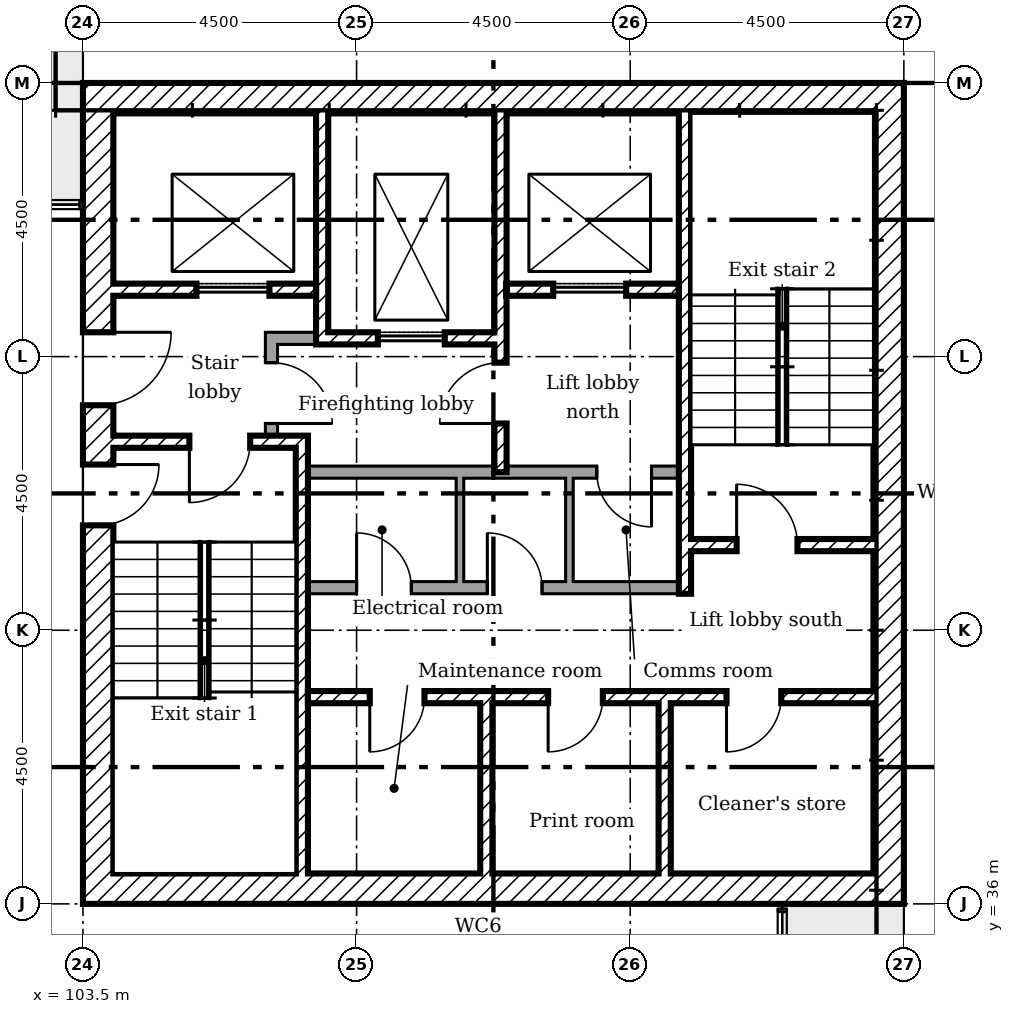
"""IFC4 building model, lengths in metres.
Left out: names, types, materials, properties, quantities, classifications, styles, units other than length and angle.
Written with IfcOpenShell. Run it as: python <this file> out.ifc"""

import sys

from ifc_helpers import new_model, si_unit, direction, frame, frame_2d, origin, place, context, subcontext, project, spatial, rectangle, extrude, element, fill, save


model = new_model("IFC4")
c1 = context("Model", 3, precision=1e-05, world=origin(), true_north=direction((0.0, 1.0)))
c2 = subcontext(c1, "Body", "Model", "MODEL_VIEW")
j1 = project(units=[si_unit("LENGTHUNIT", "METRE"), si_unit("PLANEANGLEUNIT", "RADIAN")], contexts=[c1])
p1 = place(None, origin())
s1 = spatial("IfcSite", under=j1, at=p1, CompositionType="ELEMENT")
p2 = place(p1, origin())
s2 = spatial("IfcBuilding", under=s1, at=p2, CompositionType="ELEMENT")
p3 = place(p2, frame((0.0, 0.0, 195.6)))
s3 = spatial("IfcBuildingStorey", under=s2, at=p3, CompositionType="ELEMENT", Elevation=195.6)
p4 = place(p3, frame((116.75, 36.0, 0.0), z_axis=(0.0, 0.0, 1.0), x_axis=(0.0, 1.0, 0.0)))
e1 = element("IfcWall", 1, at=p4, inside=s3, PredefinedType="SHEAR", context=c2, shape_type="SweptSolid", body=[
    extrude(rectangle(XDim=13.5, YDim=0.5, at=frame_2d((6.75, 0.0))), origin(), (0.0, 0.0, 1.0), 3.35),
])
for number, where in (
    (2, (103.5, 49.25, 0.0)),
    (3, (103.5, 36.25, 0.0)),
):
    element("IfcWall", number, at=place(p3, frame(where)), inside=s3, PredefinedType="SHEAR", context=c2, shape_type="SweptSolid", body=[
        extrude(rectangle(XDim=13.0, YDim=0.5, at=frame_2d((6.5, 0.0))), origin(), (0.0, 0.0, 1.0), 3.35),
    ])
p5 = place(p3, frame((103.75, 36.5, 0.0), z_axis=(0.0, 0.0, 1.0), x_axis=(0.0, 1.0, 0.0)))
e4 = element("IfcWall", 4, at=p5, inside=s3, PredefinedType="SHEAR", context=c2, shape_type="SweptSolid", body=[
    extrude(rectangle(XDim=12.5, YDim=0.5, at=frame_2d((6.25, 0.0))), origin(), (0.0, 0.0, 1.0), 3.35),
])
p6 = place(p5, frame((7.7, 0.0, 0.0)))
e5 = element("IfcOpeningElement", 5, at=p6, cuts=e4, PredefinedType="OPENING", context=c2, shape_type="SweptSolid", body=[
    extrude(rectangle(XDim=1.2, YDim=2.1, at=frame_2d((0.6, 1.05))), frame((0.0, 0.26, 0.0), z_axis=(0.0, -1.0, 0.0), x_axis=(1.0, 0.0, 0.0)), (0.0, 0.0, 1.0), 0.52),
])
p7 = place(p5, frame((5.725, 0.0, 0.0)))
e6 = element("IfcOpeningElement", 6, at=p7, cuts=e4, PredefinedType="OPENING", context=c2, shape_type="SweptSolid", body=[
    extrude(rectangle(XDim=1.0, YDim=2.1, at=frame_2d((0.5, 1.05))), frame((0.0, 0.26, 0.0), z_axis=(0.0, -1.0, 0.0), x_axis=(1.0, 0.0, 0.0)), (0.0, 0.0, 1.0), 0.52),
])
p8 = place(p3, frame((107.433, 49.0, 0.0), z_axis=(0.0, 0.0, 1.0), x_axis=(0.0, -1.0, 0.0)))
e7 = element("IfcWall", 7, at=p8, inside=s3, PredefinedType="SHEAR", context=c2, shape_type="SweptSolid", body=[
    extrude(rectangle(XDim=3.8, YDim=0.2, at=frame_2d((1.9, 0.0))), origin(), (0.0, 0.0, 1.0), 3.35),
])
p9 = place(p3, frame((110.367, 49.0, 0.0), z_axis=(0.0, 0.0, 1.0), x_axis=(0.0, -1.0, 0.0)))
e8 = element("IfcWall", 8, at=p9, inside=s3, PredefinedType="SHEAR", context=c2, shape_type="SweptSolid", body=[
    extrude(rectangle(XDim=5.9, YDim=0.2, at=frame_2d((2.95, 0.0))), origin(), (0.0, 0.0, 1.0), 3.35),
])
p10 = place(p9, frame((4.1, 0.0, 0.0)))
e9 = element("IfcOpeningElement", 9, at=p10, cuts=e8, PredefinedType="OPENING", context=c2, shape_type="SweptSolid", body=[
    extrude(rectangle(XDim=1.0, YDim=2.1, at=frame_2d((0.5, 1.05))), frame((0.0, 0.11, 0.0), z_axis=(0.0, -1.0, 0.0), x_axis=(1.0, 0.0, 0.0)), (0.0, 0.0, 1.0), 0.22),
])
for number, where, z_axis, x_axis in (
    (10, (110.133, 36.5, 0.0), (0.0, 0.0, 1.0), (0.0, 1.0, 0.0)),
    (11, (113.067, 36.5, 0.0), (0.0, 0.0, 1.0), (0.0, 1.0, 0.0)),
):
    element("IfcWall", number, at=place(p3, frame(where, z_axis=z_axis, x_axis=x_axis)), inside=s3, PredefinedType="SHEAR", context=c2, shape_type="SweptSolid", body=[
        extrude(rectangle(XDim=2.8, YDim=0.2, at=frame_2d((1.4, 0.0))), origin(), (0.0, 0.0, 1.0), 3.35),
    ])
p11 = place(p3, frame((106.5, 45.3, 0.0)))
e12 = element("IfcWall", 12, at=p11, inside=s3, PredefinedType="PARTITIONING", context=c2, shape_type="SweptSolid", body=[
    extrude(rectangle(XDim=0.833, YDim=0.2, at=frame_2d((0.417, 0.0))), origin(), (0.0, 0.0, 1.0), 3.35),
])
p12 = place(p3, frame((106.6, 43.7, 0.0), z_axis=(0.0, 0.0, 1.0), x_axis=(0.0, 1.0, 0.0)))
e13 = element("IfcWall", 13, at=p12, inside=s3, PredefinedType="PARTITIONING", context=c2, shape_type="SweptSolid", body=[
    extrude(rectangle(XDim=1.5, YDim=0.2, at=frame_2d((0.75, 0.0))), origin(), (0.0, 0.0, 1.0), 3.35),
])
p13 = place(p12, frame((0.2, 0.0, 0.0)))
e14 = element("IfcOpeningElement", 14, at=p13, cuts=e13, PredefinedType="OPENING", context=c2, shape_type="SweptSolid", body=[
    extrude(rectangle(XDim=1.0, YDim=2.1, at=frame_2d((0.5, 1.05))), frame((0.0, 0.11, 0.0), z_axis=(0.0, -1.0, 0.0), x_axis=(1.0, 0.0, 0.0)), (0.0, 0.0, 1.0), 0.22),
])
p14 = place(p3, frame((104.0, 46.1, 0.0)))
e15 = element("IfcWall", 15, at=p14, inside=s3, PredefinedType="SHEAR", context=c2, shape_type="SweptSolid", body=[
    extrude(rectangle(XDim=3.333, YDim=0.2, at=frame_2d((1.667, 0.0))), origin(), (0.0, 0.0, 1.0), 3.35),
])
p15 = place(p14, frame((1.367, 0.0, 0.0)))
e16 = element("IfcOpeningElement", 16, at=p15, cuts=e15, PredefinedType="OPENING", context=c2, shape_type="SweptSolid", body=[
    extrude(rectangle(XDim=1.2, YDim=2.1, at=frame_2d((0.6, 1.05))), frame((0.0, 0.11, 0.0), z_axis=(0.0, -1.0, 0.0), x_axis=(1.0, 0.0, 0.0)), (0.0, 0.0, 1.0), 0.22),
])
p16 = place(p3, frame((110.467, 46.1, 0.0)))
e17 = element("IfcWall", 17, at=p16, inside=s3, PredefinedType="SHEAR", context=c2, shape_type="SweptSolid", body=[
    extrude(rectangle(XDim=2.833, YDim=0.2, at=frame_2d((1.417, 0.0))), origin(), (0.0, 0.0, 1.0), 3.35),
])
p17 = place(p16, frame((0.767, 0.0, 0.0)))
e18 = element("IfcOpeningElement", 18, at=p17, cuts=e17, PredefinedType="OPENING", context=c2, shape_type="SweptSolid", body=[
    extrude(rectangle(XDim=1.2, YDim=2.1, at=frame_2d((0.6, 1.05))), frame((0.0, 0.11, 0.0), z_axis=(0.0, -1.0, 0.0), x_axis=(1.0, 0.0, 0.0)), (0.0, 0.0, 1.0), 0.22),
])
p18 = place(p3, frame((107.533, 45.3, 0.0)))
e19 = element("IfcWall", 19, at=p18, inside=s3, PredefinedType="SHEAR", context=c2, shape_type="SweptSolid", body=[
    extrude(rectangle(XDim=2.733, YDim=0.2, at=frame_2d((1.367, 0.0))), origin(), (0.0, 0.0, 1.0), 3.35),
])
p19 = place(p18, frame((0.817, 0.0, 0.0)))
e20 = element("IfcOpeningElement", 20, at=p19, cuts=e19, PredefinedType="OPENING", context=c2, shape_type="SweptSolid", body=[
    extrude(rectangle(XDim=1.1, YDim=2.1, at=frame_2d((0.55, 1.05))), frame((0.0, 0.11, 0.0), z_axis=(0.0, -1.0, 0.0), x_axis=(1.0, 0.0, 0.0)), (0.0, 0.0, 1.0), 0.22),
])
p20 = place(p3, frame((107.2, 39.4, 0.0)))
e21 = element("IfcWall", 21, at=p20, inside=s3, PredefinedType="SHEAR", context=c2, shape_type="SweptSolid", body=[
    extrude(rectangle(XDim=9.3, YDim=0.2, at=frame_2d((4.65, 0.0))), origin(), (0.0, 0.0, 1.0), 3.35),
])
p21 = place(p20, frame((1.017, 0.0, 0.0)))
e22 = element("IfcOpeningElement", 22, at=p21, cuts=e21, PredefinedType="OPENING", context=c2, shape_type="SweptSolid", body=[
    extrude(rectangle(XDim=0.9, YDim=2.1, at=frame_2d((0.45, 1.05))), frame((0.0, 0.11, 0.0), z_axis=(0.0, -1.0, 0.0), x_axis=(1.0, 0.0, 0.0)), (0.0, 0.0, 1.0), 0.22),
])
p22 = place(p20, frame((3.95, 0.0, 0.0)))
e23 = element("IfcOpeningElement", 23, at=p22, cuts=e21, PredefinedType="OPENING", context=c2, shape_type="SweptSolid", body=[
    extrude(rectangle(XDim=0.9, YDim=2.1, at=frame_2d((0.45, 1.05))), frame((0.0, 0.11, 0.0), z_axis=(0.0, -1.0, 0.0), x_axis=(1.0, 0.0, 0.0)), (0.0, 0.0, 1.0), 0.22),
])
p23 = place(p20, frame((6.883, 0.0, 0.0)))
e24 = element("IfcOpeningElement", 24, at=p23, cuts=e21, PredefinedType="OPENING", context=c2, shape_type="SweptSolid", body=[
    extrude(rectangle(XDim=0.9, YDim=2.1, at=frame_2d((0.45, 1.05))), frame((0.0, 0.11, 0.0), z_axis=(0.0, -1.0, 0.0), x_axis=(1.0, 0.0, 0.0)), (0.0, 0.0, 1.0), 0.22),
])
p24 = place(p3, frame((107.1, 36.5, 0.0), z_axis=(0.0, 0.0, 1.0), x_axis=(0.0, 1.0, 0.0)))
e25 = element("IfcWall", 25, at=p24, inside=s3, PredefinedType="SHEAR", context=c2, shape_type="SweptSolid", body=[
    extrude(rectangle(XDim=7.2, YDim=0.2, at=frame_2d((3.6, 0.0))), origin(), (0.0, 0.0, 1.0), 3.35),
])
p25 = place(p3, frame((104.0, 43.6, 0.0)))
e26 = element("IfcWall", 26, at=p25, inside=s3, PredefinedType="SHEAR", context=c2, shape_type="SweptSolid", body=[
    extrude(rectangle(XDim=3.0, YDim=0.2, at=frame_2d((1.5, 0.0))), origin(), (0.0, 0.0, 1.0), 3.35),
])
p26 = place(p25, frame((1.25, 0.0, 0.0)))
e27 = element("IfcOpeningElement", 27, at=p26, cuts=e26, PredefinedType="OPENING", context=c2, shape_type="SweptSolid", body=[
    extrude(rectangle(XDim=1.0, YDim=2.1, at=frame_2d((0.5, 1.05))), frame((0.0, 0.11, 0.0), z_axis=(0.0, -1.0, 0.0), x_axis=(1.0, 0.0, 0.0)), (0.0, 0.0, 1.0), 0.22),
])
p27 = place(p3, frame((113.5, 41.9, 0.0)))
e28 = element("IfcWall", 28, at=p27, inside=s3, PredefinedType="SHEAR", context=c2, shape_type="SweptSolid", body=[
    extrude(rectangle(XDim=3.0, YDim=0.2, at=frame_2d((1.5, 0.0))), origin(), (0.0, 0.0, 1.0), 3.35),
])
p28 = place(p27, frame((0.75, 0.0, 0.0)))
e29 = element("IfcOpeningElement", 29, at=p28, cuts=e28, PredefinedType="OPENING", context=c2, shape_type="SweptSolid", body=[
    extrude(rectangle(XDim=1.0, YDim=2.1, at=frame_2d((0.5, 1.05))), frame((0.0, 0.11, 0.0), z_axis=(0.0, -1.0, 0.0), x_axis=(1.0, 0.0, 0.0)), (0.0, 0.0, 1.0), 0.22),
])
p29 = place(p3, frame((113.4, 41.1, 0.0), z_axis=(0.0, 0.0, 1.0), x_axis=(0.0, 1.0, 0.0)))
e30 = element("IfcWall", 30, at=p29, inside=s3, PredefinedType="SHEAR", context=c2, shape_type="SweptSolid", body=[
    extrude(rectangle(XDim=7.9, YDim=0.2, at=frame_2d((3.95, 0.0))), origin(), (0.0, 0.0, 1.0), 3.35),
])
p30 = place(p3, frame((107.2, 43.1, 0.0)))
e31 = element("IfcWall", 31, at=p30, inside=s3, PredefinedType="PARTITIONING", context=c2, shape_type="SweptSolid", body=[
    extrude(rectangle(XDim=6.1, YDim=0.2, at=frame_2d((3.05, 0.0))), origin(), (0.0, 0.0, 1.0), 3.35),
])
p31 = place(p30, frame((4.75, 0.0, 0.0)))
e32 = element("IfcOpeningElement", 32, at=p31, cuts=e31, PredefinedType="OPENING", context=c2, shape_type="SweptSolid", body=[
    extrude(rectangle(XDim=0.9, YDim=2.1, at=frame_2d((0.45, 1.05))), frame((0.0, 0.11, 0.0), z_axis=(0.0, -1.0, 0.0), x_axis=(1.0, 0.0, 0.0)), (0.0, 0.0, 1.0), 0.22),
])
p32 = place(p3, frame((107.2, 41.2, 0.0)))
e33 = element("IfcWall", 33, at=p32, inside=s3, PredefinedType="PARTITIONING", context=c2, shape_type="SweptSolid", body=[
    extrude(rectangle(XDim=6.1, YDim=0.2, at=frame_2d((3.05, 0.0))), origin(), (0.0, 0.0, 1.0), 3.35),
])
p33 = place(p32, frame((0.8, 0.0, 0.0)))
e34 = element("IfcOpeningElement", 34, at=p33, cuts=e33, PredefinedType="OPENING", context=c2, shape_type="SweptSolid", body=[
    extrude(rectangle(XDim=0.9, YDim=2.1, at=frame_2d((0.45, 1.05))), frame((0.0, 0.11, 0.0), z_axis=(0.0, -1.0, 0.0), x_axis=(1.0, 0.0, 0.0)), (0.0, 0.0, 1.0), 0.22),
])
p34 = place(p32, frame((2.95, 0.0, 0.0)))
e35 = element("IfcOpeningElement", 35, at=p34, cuts=e33, PredefinedType="OPENING", context=c2, shape_type="SweptSolid", body=[
    extrude(rectangle(XDim=0.9, YDim=2.1, at=frame_2d((0.45, 1.05))), frame((0.0, 0.11, 0.0), z_axis=(0.0, -1.0, 0.0), x_axis=(1.0, 0.0, 0.0)), (0.0, 0.0, 1.0), 0.22),
])
for number, where, z_axis, x_axis in (
    (36, (109.7, 41.3, 0.0), (0.0, 0.0, 1.0), (0.0, 1.0, 0.0)),
    (37, (111.5, 41.3, 0.0), (0.0, 0.0, 1.0), (0.0, 1.0, 0.0)),
):
    element("IfcWall", number, at=place(p3, frame(where, z_axis=z_axis, x_axis=x_axis)), inside=s3, PredefinedType="PARTITIONING", context=c2, shape_type="SweptSolid", body=[
        extrude(rectangle(XDim=1.7, YDim=0.125, at=frame_2d((0.85, 0.0))), origin(), (0.0, 0.0, 1.0), 3.35),
    ])
p35 = place(p6, frame((1.2, 0.0, 0.0), x_axis=(-1.0, 0.0, 0.0)))
e38 = element("IfcDoor", 38, at=p35, inside=s3, OperationType="SINGLE_SWING_RIGHT", PredefinedType="DOOR", context=c2, shape_type="SweptSolid", body=[
    extrude(rectangle(XDim=1.2, YDim=2.1, at=frame_2d((0.6, 1.05))), frame((0.0, 0.025, 0.0), z_axis=(0.0, -1.0, 0.0), x_axis=(1.0, 0.0, 0.0)), (0.0, 0.0, 1.0), 0.05),
])
fill(e5, e38)
p36 = place(p26, frame((1.0, 0.0, 0.0), x_axis=(-1.0, 0.0, 0.0)))
e39 = element("IfcDoor", 39, at=p36, inside=s3, OperationType="SINGLE_SWING_LEFT", PredefinedType="DOOR", context=c2, shape_type="SweptSolid", body=[
    extrude(rectangle(XDim=1.0, YDim=2.1, at=frame_2d((0.5, 1.05))), frame((0.0, 0.025, 0.0), z_axis=(0.0, -1.0, 0.0), x_axis=(1.0, 0.0, 0.0)), (0.0, 0.0, 1.0), 0.05),
])
fill(e27, e39)
p37 = place(p7, frame((1.0, 0.0, 0.0), x_axis=(-1.0, 0.0, 0.0)))
e40 = element("IfcDoor", 40, at=p37, inside=s3, OperationType="SINGLE_SWING_RIGHT", PredefinedType="DOOR", context=c2, shape_type="SweptSolid", body=[
    extrude(rectangle(XDim=1.0, YDim=2.1, at=frame_2d((0.5, 1.05))), frame((0.0, 0.025, 0.0), z_axis=(0.0, -1.0, 0.0), x_axis=(1.0, 0.0, 0.0)), (0.0, 0.0, 1.0), 0.05),
])
fill(e6, e40)
p38 = place(p28, origin())
e41 = element("IfcDoor", 41, at=p38, inside=s3, OperationType="SINGLE_SWING_RIGHT", PredefinedType="DOOR", context=c2, shape_type="SweptSolid", body=[
    extrude(rectangle(XDim=1.0, YDim=2.1, at=frame_2d((0.5, 1.05))), frame((0.0, 0.025, 0.0), z_axis=(0.0, -1.0, 0.0), x_axis=(1.0, 0.0, 0.0)), (0.0, 0.0, 1.0), 0.05),
])
fill(e29, e41)
p39 = place(p10, frame((1.0, 0.0, 0.0), x_axis=(-1.0, 0.0, 0.0)))
e42 = element("IfcDoor", 42, at=p39, inside=s3, OperationType="SINGLE_SWING_RIGHT", PredefinedType="DOOR", context=c2, shape_type="SweptSolid", body=[
    extrude(rectangle(XDim=1.0, YDim=2.1, at=frame_2d((0.5, 1.05))), frame((0.0, 0.025, 0.0), z_axis=(0.0, -1.0, 0.0), x_axis=(1.0, 0.0, 0.0)), (0.0, 0.0, 1.0), 0.05),
])
fill(e9, e42)
p40 = place(p13, frame((1.0, 0.0, 0.0), x_axis=(-1.0, 0.0, 0.0)))
e43 = element("IfcDoor", 43, at=p40, inside=s3, OperationType="SINGLE_SWING_LEFT", PredefinedType="DOOR", context=c2, shape_type="SweptSolid", body=[
    extrude(rectangle(XDim=1.0, YDim=2.1, at=frame_2d((0.5, 1.05))), frame((0.0, 0.025, 0.0), z_axis=(0.0, -1.0, 0.0), x_axis=(1.0, 0.0, 0.0)), (0.0, 0.0, 1.0), 0.05),
])
fill(e14, e43)
p41 = place(p21, frame((0.9, 0.0, 0.0), x_axis=(-1.0, 0.0, 0.0)))
e44 = element("IfcDoor", 44, at=p41, inside=s3, OperationType="SINGLE_SWING_LEFT", PredefinedType="DOOR", context=c2, shape_type="SweptSolid", body=[
    extrude(rectangle(XDim=0.9, YDim=2.1, at=frame_2d((0.45, 1.05))), frame((0.0, 0.025, 0.0), z_axis=(0.0, -1.0, 0.0), x_axis=(1.0, 0.0, 0.0)), (0.0, 0.0, 1.0), 0.05),
])
fill(e22, e44)
p42 = place(p22, frame((0.9, 0.0, 0.0), x_axis=(-1.0, 0.0, 0.0)))
e45 = element("IfcDoor", 45, at=p42, inside=s3, OperationType="SINGLE_SWING_LEFT", PredefinedType="DOOR", context=c2, shape_type="SweptSolid", body=[
    extrude(rectangle(XDim=0.9, YDim=2.1, at=frame_2d((0.45, 1.05))), frame((0.0, 0.025, 0.0), z_axis=(0.0, -1.0, 0.0), x_axis=(1.0, 0.0, 0.0)), (0.0, 0.0, 1.0), 0.05),
])
fill(e23, e45)
p43 = place(p23, frame((0.9, 0.0, 0.0), x_axis=(-1.0, 0.0, 0.0)))
e46 = element("IfcDoor", 46, at=p43, inside=s3, OperationType="SINGLE_SWING_LEFT", PredefinedType="DOOR", context=c2, shape_type="SweptSolid", body=[
    extrude(rectangle(XDim=0.9, YDim=2.1, at=frame_2d((0.45, 1.05))), frame((0.0, 0.025, 0.0), z_axis=(0.0, -1.0, 0.0), x_axis=(1.0, 0.0, 0.0)), (0.0, 0.0, 1.0), 0.05),
])
fill(e24, e46)
p44 = place(p33, origin())
e47 = element("IfcDoor", 47, at=p44, inside=s3, OperationType="SINGLE_SWING_RIGHT", PredefinedType="DOOR", context=c2, shape_type="SweptSolid", body=[
    extrude(rectangle(XDim=0.9, YDim=2.1, at=frame_2d((0.45, 1.05))), frame((0.0, 0.025, 0.0), z_axis=(0.0, -1.0, 0.0), x_axis=(1.0, 0.0, 0.0)), (0.0, 0.0, 1.0), 0.05),
])
fill(e34, e47)
p45 = place(p34, origin())
e48 = element("IfcDoor", 48, at=p45, inside=s3, OperationType="SINGLE_SWING_RIGHT", PredefinedType="DOOR", context=c2, shape_type="SweptSolid", body=[
    extrude(rectangle(XDim=0.9, YDim=2.1, at=frame_2d((0.45, 1.05))), frame((0.0, 0.025, 0.0), z_axis=(0.0, -1.0, 0.0), x_axis=(1.0, 0.0, 0.0)), (0.0, 0.0, 1.0), 0.05),
])
fill(e35, e48)
p46 = place(p31, frame((0.9, 0.0, 0.0), x_axis=(-1.0, 0.0, 0.0)))
e49 = element("IfcDoor", 49, at=p46, inside=s3, OperationType="SINGLE_SWING_RIGHT", PredefinedType="DOOR", context=c2, shape_type="SweptSolid", body=[
    extrude(rectangle(XDim=0.9, YDim=2.1, at=frame_2d((0.45, 1.05))), frame((0.0, 0.025, 0.0), z_axis=(0.0, -1.0, 0.0), x_axis=(1.0, 0.0, 0.0)), (0.0, 0.0, 1.0), 0.05),
])
fill(e32, e49)
p47 = place(p19, origin())
e50 = element("IfcDoor", 50, at=p47, inside=s3, OperationType="SLIDING_TO_LEFT", PredefinedType="DOOR", context=c2, shape_type="SweptSolid", body=[
    extrude(rectangle(XDim=1.1, YDim=2.1, at=frame_2d((0.55, 1.05))), frame((0.0, 0.025, 0.0), z_axis=(0.0, -1.0, 0.0), x_axis=(1.0, 0.0, 0.0)), (0.0, 0.0, 1.0), 0.05),
])
fill(e20, e50)
p48 = place(p15, origin())
e51 = element("IfcDoor", 51, at=p48, inside=s3, OperationType="SLIDING_TO_LEFT", PredefinedType="DOOR", context=c2, shape_type="SweptSolid", body=[
    extrude(rectangle(XDim=1.2, YDim=2.1, at=frame_2d((0.6, 1.05))), frame((0.0, 0.025, 0.0), z_axis=(0.0, -1.0, 0.0), x_axis=(1.0, 0.0, 0.0)), (0.0, 0.0, 1.0), 0.05),
])
fill(e16, e51)
p49 = place(p17, origin())
e52 = element("IfcDoor", 52, at=p49, inside=s3, OperationType="SLIDING_TO_LEFT", PredefinedType="DOOR", context=c2, shape_type="SweptSolid", body=[
    extrude(rectangle(XDim=1.2, YDim=2.1, at=frame_2d((0.6, 1.05))), frame((0.0, 0.025, 0.0), z_axis=(0.0, -1.0, 0.0), x_axis=(1.0, 0.0, 0.0)), (0.0, 0.0, 1.0), 0.05),
])
fill(e18, e52)
save(model, sys.argv[1])
